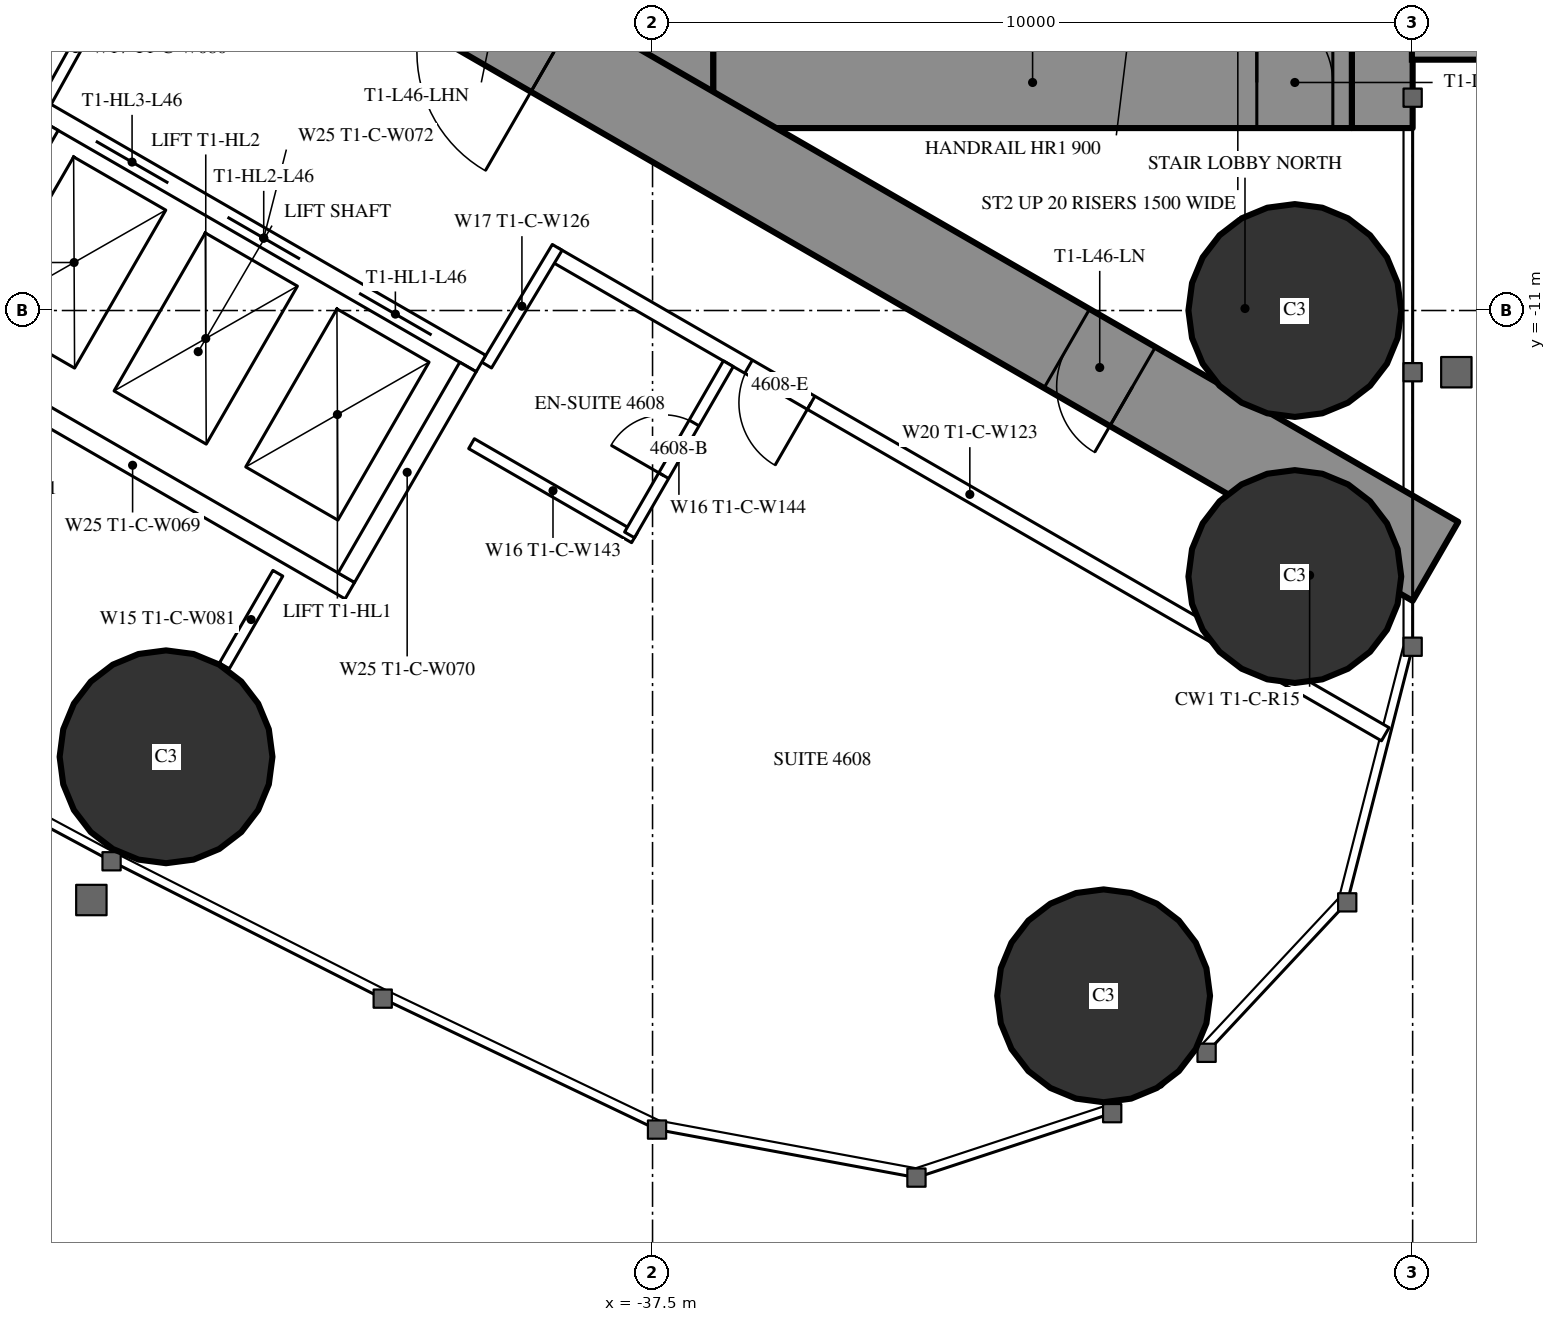
"""IFC4 building model, lengths in metres.
Left out: names, types, materials, properties, quantities, classifications, styles, units other than length and angle.
Written with IfcOpenShell. Run it as: python <this file> out.ifc"""

import sys

from ifc_helpers import new_model, si_unit, direction, frame, frame_2d, origin, origin_2d, place, context, subcontext, project, spatial, rectangle, circle, extrude, element, fill, save


model = new_model("IFC4")
c1 = context("Model", 3, precision=1e-05, world=origin(), true_north=direction((0.0, 1.0)))
c2 = subcontext(c1, "Body", "Model", "MODEL_VIEW")
j1 = project(units=[si_unit("LENGTHUNIT", "METRE"), si_unit("PLANEANGLEUNIT", "RADIAN")], contexts=[c1])
p1 = place(None, origin())
s1 = spatial("IfcSite", under=j1, at=p1, CompositionType="ELEMENT")
p2 = place(p1, origin())
s2 = spatial("IfcBuilding", under=s1, at=p2, CompositionType="ELEMENT")
p3 = place(p2, frame((0.0, 0.0, 173.8)))
s3 = spatial("IfcBuildingStorey", under=s2, at=p3, CompositionType="ELEMENT", Elevation=173.8)
for number, where, z_axis, x_axis in (
    (1, (-31.565, -20.016, 0.0), (0.0, 0.0, 1.0), (1.0, 0.0, 0.0)),
    (2, (-29.05, -11.0, 0.0), (0.0, 0.0, 1.0), (1.0, 0.0, 0.0)),
    (3, (-29.05, -14.5, 0.0), (0.0, 0.0, 1.0), (1.0, 0.0, 0.0)),
    (4, (-43.9, -16.871, 0.0), (0.0, 0.0, 1.0), (1.0, 0.0, 0.0)),
):
    element("IfcColumn", number, at=place(p3, frame(where, z_axis=z_axis, x_axis=x_axis)), inside=s3, PredefinedType="COLUMN", context=c2, shape_type="SweptSolid", body=[
        extrude(circle(Radius=1.4, at=origin_2d()), origin(), (0.0, 0.0, 1.0), 3.5),
    ])
p4 = place(p3, frame((-27.9, 8.6, 0.0), z_axis=(0.0, 0.0, 1.0), x_axis=(0.0, -1.0, 0.0)))
e5 = element("IfcWall", 5, at=p4, inside=s3, PredefinedType="SHEAR", context=c2, shape_type="SweptSolid", body=[
    extrude(rectangle(XDim=17.2, YDim=0.8, at=frame_2d((8.6, 0.0))), origin(), (0.0, 0.0, 1.0), 3.5),
])
p5 = place(p4, frame((2.45, 0.0, 0.6)))
e6 = element("IfcOpeningElement", 6, at=p5, cuts=e5, PredefinedType="OPENING", context=c2, shape_type="SweptSolid", body=[
    extrude(rectangle(XDim=0.6, YDim=2.1, at=frame_2d((0.3, 1.05))), frame((0.0, 0.41, 0.0), z_axis=(0.0, -1.0, 0.0), x_axis=(1.0, 0.0, 0.0)), (0.0, 0.0, 1.0), 0.82),
])
p6 = place(p4, frame((14.15, 0.0, 0.6)))
e7 = element("IfcOpeningElement", 7, at=p6, cuts=e5, PredefinedType="OPENING", context=c2, shape_type="SweptSolid", body=[
    extrude(rectangle(XDim=0.6, YDim=2.1, at=frame_2d((0.3, 1.05))), frame((0.0, 0.41, 0.0), z_axis=(0.0, -1.0, 0.0), x_axis=(1.0, 0.0, 0.0)), (0.0, 0.0, 1.0), 0.82),
])
p7 = place(p3, frame((-37.3, 8.6, 0.0), z_axis=(0.0, 0.0, 1.0), x_axis=(0.0, -1.0, 0.0)))
e8 = element("IfcWall", 8, at=p7, inside=s3, PredefinedType="SHEAR", context=c2, shape_type="SweptSolid", body=[
    extrude(rectangle(XDim=17.2, YDim=1.2, at=frame_2d((8.6, 0.0))), origin(), (0.0, 0.0, 1.0), 3.5),
])
p8 = place(p7, frame((7.7, 0.0, 0.0)))
e9 = element("IfcOpeningElement", 9, at=p8, cuts=e8, PredefinedType="OPENING", context=c2, shape_type="SweptSolid", body=[
    extrude(rectangle(XDim=1.8, YDim=2.2, at=frame_2d((0.9, 1.1))), frame((0.0, 0.61, 0.0), z_axis=(0.0, -1.0, 0.0), x_axis=(1.0, 0.0, 0.0)), (0.0, 0.0, 1.0), 1.22),
])
p9 = place(p3, frame((-28.3, -8.0, 0.0), z_axis=(0.0, 0.0, 1.0), x_axis=(-1.0, 0.0, 0.0)))
e10 = element("IfcWall", 10, at=p9, inside=s3, PredefinedType="SHEAR", context=c2, shape_type="SweptSolid", body=[
    extrude(rectangle(XDim=8.4, YDim=1.2, at=frame_2d((4.2, 0.0))), origin(), (0.0, 0.0, 1.0), 3.5),
])
p10 = place(p9, frame((0.25, 0.0, 0.0)))
e11 = element("IfcOpeningElement", 11, at=p10, cuts=e10, PredefinedType="OPENING", context=c2, shape_type="SweptSolid", body=[
    extrude(rectangle(XDim=1.0, YDim=2.2, at=frame_2d((0.5, 1.1))), frame((0.0, 0.61, 0.0), z_axis=(0.0, -1.0, 0.0), x_axis=(1.0, 0.0, 0.0)), (0.0, 0.0, 1.0), 1.22),
])
p11 = place(p3, frame((-27.2, -14.3, 0.0), z_axis=(0.0, 0.0, 1.0), x_axis=(-0.866024021859, 0.500002393557, 0.0)))
e12 = element("IfcWall", 12, at=p11, inside=s3, PredefinedType="SHEAR", context=c2, shape_type="SweptSolid", body=[
    extrude(rectangle(XDim=27.907, YDim=1.2, at=frame_2d((13.954, 0.0))), origin(), (0.0, 0.0, 1.0), 3.5),
])
p12 = place(p11, frame((4.6, 0.0, 0.0)))
e13 = element("IfcOpeningElement", 13, at=p12, cuts=e12, PredefinedType="OPENING", context=c2, shape_type="SweptSolid", body=[
    extrude(rectangle(XDim=1.0, YDim=2.2, at=frame_2d((0.5, 1.1))), frame((0.0, 0.61, 0.0), z_axis=(0.0, -1.0, 0.0), x_axis=(1.0, 0.0, 0.0)), (0.0, 0.0, 1.0), 1.22),
])
p13 = place(p11, frame((13.395, 0.0, 0.0)))
e14 = element("IfcOpeningElement", 14, at=p13, cuts=e12, PredefinedType="OPENING", context=c2, shape_type="SweptSolid", body=[
    extrude(rectangle(XDim=1.8, YDim=2.2, at=frame_2d((0.9, 1.1))), frame((0.0, 0.61, 0.0), z_axis=(0.0, -1.0, 0.0), x_axis=(1.0, 0.0, 0.0)), (0.0, 0.0, 1.0), 1.22),
])
p14 = place(p3, frame((-42.429, -14.457, 0.0), z_axis=(0.0, 0.0, 1.0), x_axis=(-0.5000578829, -0.865991982497, 0.0)))
e15 = element("IfcWall", 15, at=p14, inside=s3, PredefinedType="PARTITIONING", context=c2, shape_type="SweptSolid", body=[
    extrude(rectangle(XDim=1.407, YDim=0.15, at=frame_2d((0.704, 0.0))), origin(), (0.0, 0.0, 1.0), 3.25),
])
p15 = place(p3, frame((-27.86, -16.575, 0.0), z_axis=(0.0, 0.0, 1.0), x_axis=(-0.866027756871, 0.499995924312, 0.0)))
e16 = element("IfcWall", 16, at=p15, inside=s3, PredefinedType="PARTITIONING", context=c2, shape_type="SweptSolid", body=[
    extrude(rectangle(XDim=12.622, YDim=0.2, at=frame_2d((6.311, 0.0))), origin(), (0.0, 0.0, 1.0), 3.25),
])
p16 = place(p15, frame((8.722, 0.0, 0.0)))
e17 = element("IfcOpeningElement", 17, at=p16, cuts=e16, PredefinedType="OPENING", context=c2, shape_type="SweptSolid", body=[
    extrude(rectangle(XDim=0.95, YDim=2.2, at=frame_2d((0.475, 1.1))), frame((0.0, 0.11, 0.0), z_axis=(0.0, -1.0, 0.0), x_axis=(1.0, 0.0, 0.0)), (0.0, 0.0, 1.0), 0.22),
])
for number, where, z_axis, x_axis in (
    (18, (-39.683, -11.718, 0.0), (0.0, 0.0, 1.0), (0.514, 0.858, 0.0)),
    (19, (-44.652, -6.764, 0.0), (0.0, 0.0, 1.0), (-0.485, -0.874, 0.0)),
):
    element("IfcWall", number, at=place(p3, frame(where, z_axis=z_axis, x_axis=x_axis)), inside=s3, PredefinedType="PARTITIONING", context=c2, shape_type="SweptSolid", body=[
        extrude(rectangle(XDim=1.805, YDim=0.15, at=frame_2d((0.903, 0.0))), origin(), (0.0, 0.0, 1.0), 3.25),
    ])
p17 = place(p3, frame((-37.738, -13.989, 0.0), z_axis=(0.0, 0.0, 1.0), x_axis=(-0.86604923931, 0.499958713387, 0.0)))
e20 = element("IfcWall", 20, at=p17, inside=s3, PredefinedType="PARTITIONING", context=c2, shape_type="SweptSolid", body=[
    extrude(rectangle(XDim=2.475, YDim=0.15, at=frame_2d((1.237, 0.0))), origin(), (0.0, 0.0, 1.0), 3.25),
])
p18 = place(p3, frame((-36.503, -11.7, 0.0), z_axis=(0.0, 0.0, 1.0), x_axis=(-0.500006934395, -0.866021400173, 0.0)))
e21 = element("IfcWall", 21, at=p18, inside=s3, PredefinedType="PARTITIONING", context=c2, shape_type="SweptSolid", body=[
    extrude(rectangle(XDim=2.6, YDim=0.15, at=frame_2d((1.3, 0.0))), origin(), (0.0, 0.0, 1.0), 3.25),
])
p19 = place(p18, frame((0.9, 0.0, 0.0)))
e22 = element("IfcOpeningElement", 22, at=p19, cuts=e21, PredefinedType="OPENING", context=c2, shape_type="SweptSolid", body=[
    extrude(rectangle(XDim=0.8, YDim=2.2, at=frame_2d((0.4, 1.1))), frame((0.0, 0.085, 0.0), z_axis=(0.0, -1.0, 0.0), x_axis=(1.0, 0.0, 0.0)), (0.0, 0.0, 1.0), 0.17),
])
p20 = place(p3, frame((-39.758, -11.697, 0.0), z_axis=(0.0, 0.0, 1.0), x_axis=(-0.866024194504, 0.500002094529, 0.0)))
e23 = element("IfcWall", 23, at=p20, inside=s3, PredefinedType="PARTITIONING", context=c2, shape_type="SweptSolid", body=[
    extrude(rectangle(XDim=6.6, YDim=0.25, at=frame_2d((3.3, 0.0))), origin(), (0.0, 0.0, 1.0), 3.25),
])
p21 = place(p20, frame((0.75, 0.0, 0.0)))
e24 = element("IfcOpeningElement", 24, at=p21, cuts=e23, PredefinedType="OPENING", context=c2, shape_type="SweptSolid", body=[
    extrude(rectangle(XDim=1.1, YDim=2.2, at=frame_2d((0.55, 1.1))), frame((0.0, 0.135, 0.0), z_axis=(0.0, -1.0, 0.0), x_axis=(1.0, 0.0, 0.0)), (0.0, 0.0, 1.0), 0.27),
])
p22 = place(p20, frame((2.75, 0.0, 0.0)))
e25 = element("IfcOpeningElement", 25, at=p22, cuts=e23, PredefinedType="OPENING", context=c2, shape_type="SweptSolid", body=[
    extrude(rectangle(XDim=1.1, YDim=2.2, at=frame_2d((0.55, 1.1))), frame((0.0, 0.135, 0.0), z_axis=(0.0, -1.0, 0.0), x_axis=(1.0, 0.0, 0.0)), (0.0, 0.0, 1.0), 0.27),
])
p23 = place(p20, frame((4.75, 0.0, 0.0)))
e26 = element("IfcOpeningElement", 26, at=p23, cuts=e23, PredefinedType="OPENING", context=c2, shape_type="SweptSolid", body=[
    extrude(rectangle(XDim=1.1, YDim=2.2, at=frame_2d((0.55, 1.1))), frame((0.0, 0.135, 0.0), z_axis=(0.0, -1.0, 0.0), x_axis=(1.0, 0.0, 0.0)), (0.0, 0.0, 1.0), 0.27),
])
p24 = place(p3, frame((-41.482, -14.686, 0.0), z_axis=(0.0, 0.0, 1.0), x_axis=(-0.86603344179, 0.499986077507, 0.0)))
e27 = element("IfcWall", 27, at=p24, inside=s3, PredefinedType="PARTITIONING", context=c2, shape_type="SweptSolid", body=[
    extrude(rectangle(XDim=6.6, YDim=0.25, at=frame_2d((3.3, 0.0))), origin(), (0.0, 0.0, 1.0), 3.25),
])
for number, where, z_axis, x_axis in (
    (28, (-39.928, -11.743, 0.0), (0.0, 0.0, 1.0), (-0.5, -0.866, 0.0)),
    (29, (-45.428, -8.568, 0.0), (0.0, 0.0, 1.0), (-0.5, -0.866, 0.0)),
):
    element("IfcWall", number, at=place(p3, frame(where, z_axis=z_axis, x_axis=x_axis)), inside=s3, PredefinedType="PARTITIONING", context=c2, shape_type="SweptSolid", body=[
        extrude(rectangle(XDim=3.201, YDim=0.25, at=frame_2d((1.6, 0.0))), origin(), (0.0, 0.0, 1.0), 3.25),
    ])
p25 = place(p19, origin())
e30 = element("IfcDoor", 30, at=p25, inside=s3, OperationType="SINGLE_SWING_RIGHT", PredefinedType="DOOR", context=c2, shape_type="SweptSolid", body=[
    extrude(rectangle(XDim=0.8, YDim=2.2, at=frame_2d((0.4, 1.1))), frame((0.0, 0.025, 0.0), z_axis=(0.0, -1.0, 0.0), x_axis=(1.0, 0.0, 0.0)), (0.0, 0.0, 1.0), 0.05),
])
fill(e22, e30)
p26 = place(p16, origin())
e31 = element("IfcDoor", 31, at=p26, inside=s3, OperationType="SINGLE_SWING_LEFT", PredefinedType="DOOR", context=c2, shape_type="SweptSolid", body=[
    extrude(rectangle(XDim=0.95, YDim=2.2, at=frame_2d((0.475, 1.1))), frame((0.0, 0.025, 0.0), z_axis=(0.0, -1.0, 0.0), x_axis=(1.0, 0.0, 0.0)), (0.0, 0.0, 1.0), 0.05),
])
fill(e17, e31)
p27 = place(p12, origin())
e32 = element("IfcDoor", 32, at=p27, inside=s3, OperationType="SINGLE_SWING_LEFT", PredefinedType="DOOR", context=c2, shape_type="SweptSolid", body=[
    extrude(rectangle(XDim=1.0, YDim=2.2, at=frame_2d((0.5, 1.1))), frame((0.0, 0.025, 0.0), z_axis=(0.0, -1.0, 0.0), x_axis=(1.0, 0.0, 0.0)), (0.0, 0.0, 1.0), 0.05),
])
fill(e13, e32)
p28 = place(p13, origin())
e33 = element("IfcDoor", 33, at=p28, inside=s3, OperationType="DOUBLE_DOOR_SINGLE_SWING", PredefinedType="DOOR", context=c2, shape_type="SweptSolid", body=[
    extrude(rectangle(XDim=1.8, YDim=2.2, at=frame_2d((0.9, 1.1))), frame((0.0, 0.025, 0.0), z_axis=(0.0, -1.0, 0.0), x_axis=(1.0, 0.0, 0.0)), (0.0, 0.0, 1.0), 0.05),
])
fill(e14, e33)
p29 = place(p10, origin())
e34 = element("IfcDoor", 34, at=p29, inside=s3, OperationType="SINGLE_SWING_RIGHT", PredefinedType="DOOR", context=c2, shape_type="SweptSolid", body=[
    extrude(rectangle(XDim=1.0, YDim=2.2, at=frame_2d((0.5, 1.1))), frame((0.0, 0.025, 0.0), z_axis=(0.0, -1.0, 0.0), x_axis=(1.0, 0.0, 0.0)), (0.0, 0.0, 1.0), 0.05),
])
fill(e11, e34)
p30 = place(p21, origin())
e35 = element("IfcDoor", 35, at=p30, inside=s3, OperationType="DOUBLE_DOOR_SLIDING", PredefinedType="USERDEFINED", context=c2, shape_type="SweptSolid", body=[
    extrude(rectangle(XDim=1.1, YDim=2.2, at=frame_2d((0.55, 1.1))), frame((0.0, 0.025, 0.0), z_axis=(0.0, -1.0, 0.0), x_axis=(1.0, 0.0, 0.0)), (0.0, 0.0, 1.0), 0.05),
])
fill(e24, e35)
p31 = place(p22, origin())
e36 = element("IfcDoor", 36, at=p31, inside=s3, OperationType="DOUBLE_DOOR_SLIDING", PredefinedType="USERDEFINED", context=c2, shape_type="SweptSolid", body=[
    extrude(rectangle(XDim=1.1, YDim=2.2, at=frame_2d((0.55, 1.1))), frame((0.0, 0.025, 0.0), z_axis=(0.0, -1.0, 0.0), x_axis=(1.0, 0.0, 0.0)), (0.0, 0.0, 1.0), 0.05),
])
fill(e25, e36)
p32 = place(p23, origin())
e37 = element("IfcDoor", 37, at=p32, inside=s3, OperationType="DOUBLE_DOOR_SLIDING", PredefinedType="USERDEFINED", context=c2, shape_type="SweptSolid", body=[
    extrude(rectangle(XDim=1.1, YDim=2.2, at=frame_2d((0.55, 1.1))), frame((0.0, 0.025, 0.0), z_axis=(0.0, -1.0, 0.0), x_axis=(1.0, 0.0, 0.0)), (0.0, 0.0, 1.0), 0.05),
])
fill(e26, e37)
save(model, sys.argv[1])
